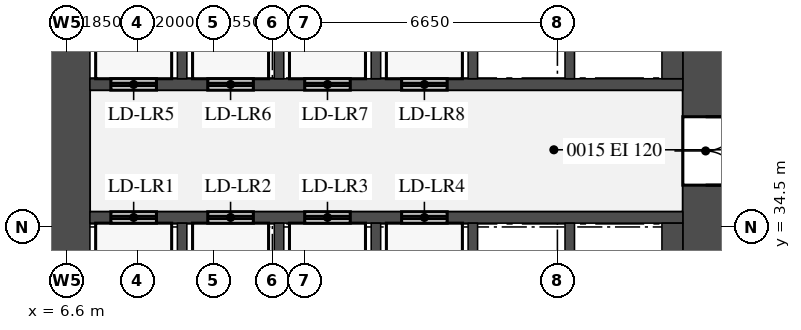
"""IFC4 building model, lengths in metres.
Left out: names, types, materials, properties, quantities, classifications, styles, units other than length and angle.
Written with IfcOpenShell. Run it as: python <this file> out.ifc"""

import sys

from ifc_helpers import new_model, si_unit, direction, frame, frame_2d, origin, place, context, subcontext, project, spatial, rectangle, extrude, source, transform, mapped, element, fill, save


model = new_model("IFC4")
c1 = context("Model", 3, precision=1e-05, world=origin(), true_north=direction((0.0, 1.0)))
c2 = subcontext(c1, "Body", "Model", "MODEL_VIEW")
j1 = project(units=[si_unit("LENGTHUNIT", "METRE"), si_unit("PLANEANGLEUNIT", "RADIAN")], contexts=[c1])
p1 = place(None, origin())
s1 = spatial("IfcSite", under=j1, at=p1, CompositionType="ELEMENT")
p2 = place(p1, origin())
s2 = spatial("IfcBuilding", under=s1, at=p2, CompositionType="ELEMENT")
p3 = place(p2, frame((0.0, 0.0, 60.0)))
s3 = spatial("IfcBuildingStorey", under=s2, at=p3, CompositionType="ELEMENT", Elevation=60.0)
m1 = source(origin(), c2, "Body", "SweptSolid", [
    extrude(rectangle(XDim=27.6, YDim=1.2, at=frame_2d((13.8, 0.0))), origin(), (0.0, 0.0, 1.0), 4.2),
])
p4 = place(p3, frame((23.4, 13.2, 0.0), z_axis=(0.0, 0.0, 1.0), x_axis=(0.0, 1.0, 0.0)))
e1 = element("IfcWall", 1, at=p4, inside=s3, PredefinedType="SHEAR", context=c2, shape_type="MappedRepresentation", body=[
    mapped(m1, transform((0.0, 0.0, 0.0))),
])
m2 = source(origin(), c2, "Body", "SweptSolid", [
    extrude(rectangle(XDim=1.8, YDim=2.1, at=frame_2d((0.9, 1.05))), frame((0.0, 0.61, 0.0), z_axis=(0.0, -1.0, 0.0), x_axis=(1.0, 0.0, 0.0)), (0.0, 0.0, 1.0), 1.22),
])
p5 = place(p4, frame((22.4, 0.0, 0.0)))
e2 = element("IfcOpeningElement", 2, at=p5, cuts=e1, PredefinedType="OPENING", context=c2, shape_type="MappedRepresentation", body=[
    mapped(m2, transform((0.0, 0.0, 0.0))),
])
m3 = source(origin(), c2, "Body", "SweptSolid", [
    extrude(rectangle(XDim=1.2, YDim=2.1, at=frame_2d((0.6, 1.05))), frame((0.0, 0.61, 0.0), z_axis=(0.0, -1.0, 0.0), x_axis=(1.0, 0.0, 0.0)), (0.0, 0.0, 1.0), 1.22),
])
p6 = place(p4, frame((12.15, 0.0, 0.0)))
e3 = element("IfcOpeningElement", 3, at=p6, cuts=e1, PredefinedType="OPENING", context=c2, shape_type="MappedRepresentation", body=[
    mapped(m3, transform((0.0, 0.0, 0.0))),
])
m4 = source(origin(), c2, "Body", "SweptSolid", [
    extrude(rectangle(XDim=0.9, YDim=2.1, at=frame_2d((0.45, 1.05))), frame((0.0, 0.61, 0.0), z_axis=(0.0, -1.0, 0.0), x_axis=(1.0, 0.0, 0.0)), (0.0, 0.0, 1.0), 1.22),
])
p7 = place(p4, frame((4.4, 0.0, 0.0)))
e4 = element("IfcOpeningElement", 4, at=p7, cuts=e1, PredefinedType="OPENING", context=c2, shape_type="MappedRepresentation", body=[
    mapped(m4, transform((0.0, 0.0, 0.0))),
])
p8 = place(p3, frame((6.6, 13.2, 0.0), z_axis=(0.0, 0.0, 1.0), x_axis=(0.0, 1.0, 0.0)))
e5 = element("IfcWall", 5, at=p8, inside=s3, PredefinedType="SHEAR", context=c2, shape_type="MappedRepresentation", body=[
    mapped(m1, transform((0.0, 0.0, 0.0))),
])
m5 = source(origin(), c2, "Body", "SweptSolid", [
    extrude(rectangle(XDim=15.6, YDim=0.3, at=frame_2d((7.8, 0.0))), origin(), (0.0, 0.0, 1.0), 4.2),
])
p9 = place(p3, frame((7.2, 38.25, 0.0), z_axis=(0.0, 0.0, 1.0), x_axis=(1.0, 0.0, 0.0)))
e6 = element("IfcWall", 6, at=p9, inside=s3, PredefinedType="STANDARD", context=c2, shape_type="MappedRepresentation", body=[
    mapped(m5, transform((0.0, 0.0, 0.0))),
])
m6 = source(origin(), c2, "Body", "SweptSolid", [
    extrude(rectangle(XDim=1.2, YDim=2.1, at=frame_2d((0.6, 1.05))), frame((0.0, 0.16, 0.0), z_axis=(0.0, -1.0, 0.0), x_axis=(1.0, 0.0, 0.0)), (0.0, 0.0, 1.0), 0.32),
])
p10 = place(p9, frame((0.55, 0.0, 0.0)))
e7 = element("IfcOpeningElement", 7, at=p10, cuts=e6, PredefinedType="OPENING", context=c2, shape_type="MappedRepresentation", body=[
    mapped(m6, transform((0.0, 0.0, 0.0))),
])
p11 = place(p9, frame((3.1, 0.0, 0.0)))
e8 = element("IfcOpeningElement", 8, at=p11, cuts=e6, PredefinedType="OPENING", context=c2, shape_type="MappedRepresentation", body=[
    mapped(m6, transform((0.0, 0.0, 0.0))),
])
p12 = place(p9, frame((5.65, 0.0, 0.0)))
e9 = element("IfcOpeningElement", 9, at=p12, cuts=e6, PredefinedType="OPENING", context=c2, shape_type="MappedRepresentation", body=[
    mapped(m6, transform((0.0, 0.0, 0.0))),
])
p13 = place(p9, frame((8.2, 0.0, 0.0)))
e10 = element("IfcOpeningElement", 10, at=p13, cuts=e6, PredefinedType="OPENING", context=c2, shape_type="MappedRepresentation", body=[
    mapped(m6, transform((0.0, 0.0, 0.0))),
])
p14 = place(p3, frame((7.2, 34.75, 0.0), z_axis=(0.0, 0.0, 1.0), x_axis=(1.0, 0.0, 0.0)))
e11 = element("IfcWall", 11, at=p14, inside=s3, PredefinedType="STANDARD", context=c2, shape_type="MappedRepresentation", body=[
    mapped(m5, transform((0.0, 0.0, 0.0))),
])
p15 = place(p14, frame((0.55, 0.0, 0.0)))
e12 = element("IfcOpeningElement", 12, at=p15, cuts=e11, PredefinedType="OPENING", context=c2, shape_type="MappedRepresentation", body=[
    mapped(m6, transform((0.0, 0.0, 0.0))),
])
p16 = place(p14, frame((3.1, 0.0, 0.0)))
e13 = element("IfcOpeningElement", 13, at=p16, cuts=e11, PredefinedType="OPENING", context=c2, shape_type="MappedRepresentation", body=[
    mapped(m6, transform((0.0, 0.0, 0.0))),
])
p17 = place(p14, frame((5.65, 0.0, 0.0)))
e14 = element("IfcOpeningElement", 14, at=p17, cuts=e11, PredefinedType="OPENING", context=c2, shape_type="MappedRepresentation", body=[
    mapped(m6, transform((0.0, 0.0, 0.0))),
])
p18 = place(p14, frame((8.2, 0.0, 0.0)))
e15 = element("IfcOpeningElement", 15, at=p18, cuts=e11, PredefinedType="OPENING", context=c2, shape_type="MappedRepresentation", body=[
    mapped(m6, transform((0.0, 0.0, 0.0))),
])
m7 = source(origin(), c2, "Body", "SweptSolid", [
    extrude(rectangle(XDim=2.4, YDim=0.25, at=frame_2d((1.2, 0.0))), origin(), (0.0, 0.0, 1.0), 4.2),
])
for number, where, z_axis, x_axis in (
    (16, (9.625, 38.4, 0.0), (0.0, 0.0, 1.0), (0.0, 1.0, 0.0)),
    (17, (12.175, 38.4, 0.0), (0.0, 0.0, 1.0), (0.0, 1.0, 0.0)),
    (18, (14.725, 38.4, 0.0), (0.0, 0.0, 1.0), (0.0, 1.0, 0.0)),
    (19, (17.275, 38.4, 0.0), (0.0, 0.0, 1.0), (0.0, 1.0, 0.0)),
    (20, (19.825, 38.4, 0.0), (0.0, 0.0, 1.0), (0.0, 1.0, 0.0)),
):
    element("IfcWall", number, at=place(p3, frame(where, z_axis=z_axis, x_axis=x_axis)), inside=s3, PredefinedType="STANDARD", context=c2, shape_type="MappedRepresentation", body=[
        mapped(m7, transform((0.0, 0.0, 0.0))),
    ])
m8 = source(origin(), c2, "Body", "SweptSolid", [
    extrude(rectangle(XDim=2.4, YDim=0.55, at=frame_2d((1.2, 0.0))), origin(), (0.0, 0.0, 1.0), 4.2),
])
p19 = place(p3, frame((22.525, 38.4, 0.0), z_axis=(0.0, 0.0, 1.0), x_axis=(0.0, 1.0, 0.0)))
e21 = element("IfcWall", 21, at=p19, inside=s3, PredefinedType="STANDARD", context=c2, shape_type="MappedRepresentation", body=[
    mapped(m8, transform((0.0, 0.0, 0.0))),
])
for number, where, z_axis, x_axis in (
    (22, (9.625, 32.2, 0.0), (0.0, 0.0, 1.0), (0.0, 1.0, 0.0)),
    (23, (12.175, 32.2, 0.0), (0.0, 0.0, 1.0), (0.0, 1.0, 0.0)),
    (24, (14.725, 32.2, 0.0), (0.0, 0.0, 1.0), (0.0, 1.0, 0.0)),
    (25, (17.275, 32.2, 0.0), (0.0, 0.0, 1.0), (0.0, 1.0, 0.0)),
    (26, (19.825, 32.2, 0.0), (0.0, 0.0, 1.0), (0.0, 1.0, 0.0)),
):
    element("IfcWall", number, at=place(p3, frame(where, z_axis=z_axis, x_axis=x_axis)), inside=s3, PredefinedType="STANDARD", context=c2, shape_type="MappedRepresentation", body=[
        mapped(m7, transform((0.0, 0.0, 0.0))),
    ])
p20 = place(p3, frame((22.525, 32.2, 0.0), z_axis=(0.0, 0.0, 1.0), x_axis=(0.0, 1.0, 0.0)))
e27 = element("IfcWall", 27, at=p20, inside=s3, PredefinedType="STANDARD", context=c2, shape_type="MappedRepresentation", body=[
    mapped(m8, transform((0.0, 0.0, 0.0))),
])
m9 = source(origin(), c2, "Body", "SweptSolid", [
    extrude(rectangle(XDim=1.8, YDim=2.1, at=frame_2d((0.9, 1.05))), frame((0.0, 0.55, 0.0), z_axis=(0.0, -1.0, 0.0), x_axis=(1.0, 0.0, 0.0)), (0.0, 0.0, 1.0), 1.1),
])
p21 = place(p5, origin())
e28 = element("IfcDoor", 28, at=p21, inside=s3, OperationType="DOUBLE_DOOR_SINGLE_SWING", PredefinedType="DOOR", context=c2, shape_type="MappedRepresentation", body=[
    mapped(m9, transform((0.0, 0.0, 0.0))),
])
fill(e2, e28)
m10 = source(origin(), c2, "Body", "SweptSolid", [
    extrude(rectangle(XDim=1.2, YDim=2.1, at=frame_2d((0.6, 1.05))), frame((0.0, 0.025, 0.0), z_axis=(0.0, -1.0, 0.0), x_axis=(1.0, 0.0, 0.0)), (0.0, 0.0, 1.0), 0.05),
])
p22 = place(p15, origin())
e29 = element("IfcDoor", 29, at=p22, inside=s3, OperationType="DOUBLE_DOOR_SLIDING", PredefinedType="DOOR", context=c2, shape_type="MappedRepresentation", body=[
    mapped(m10, transform((0.0, 0.0, 0.0))),
])
fill(e12, e29)
p23 = place(p16, origin())
e30 = element("IfcDoor", 30, at=p23, inside=s3, OperationType="DOUBLE_DOOR_SLIDING", PredefinedType="DOOR", context=c2, shape_type="MappedRepresentation", body=[
    mapped(m10, transform((0.0, 0.0, 0.0))),
])
fill(e13, e30)
p24 = place(p17, origin())
e31 = element("IfcDoor", 31, at=p24, inside=s3, OperationType="DOUBLE_DOOR_SLIDING", PredefinedType="DOOR", context=c2, shape_type="MappedRepresentation", body=[
    mapped(m10, transform((0.0, 0.0, 0.0))),
])
fill(e14, e31)
p25 = place(p18, origin())
e32 = element("IfcDoor", 32, at=p25, inside=s3, OperationType="DOUBLE_DOOR_SLIDING", PredefinedType="DOOR", context=c2, shape_type="MappedRepresentation", body=[
    mapped(m10, transform((0.0, 0.0, 0.0))),
])
fill(e15, e32)
p26 = place(p10, origin())
e33 = element("IfcDoor", 33, at=p26, inside=s3, OperationType="DOUBLE_DOOR_SLIDING", PredefinedType="DOOR", context=c2, shape_type="MappedRepresentation", body=[
    mapped(m10, transform((0.0, 0.0, 0.0))),
])
fill(e7, e33)
p27 = place(p11, origin())
e34 = element("IfcDoor", 34, at=p27, inside=s3, OperationType="DOUBLE_DOOR_SLIDING", PredefinedType="DOOR", context=c2, shape_type="MappedRepresentation", body=[
    mapped(m10, transform((0.0, 0.0, 0.0))),
])
fill(e8, e34)
p28 = place(p12, origin())
e35 = element("IfcDoor", 35, at=p28, inside=s3, OperationType="DOUBLE_DOOR_SLIDING", PredefinedType="DOOR", context=c2, shape_type="MappedRepresentation", body=[
    mapped(m10, transform((0.0, 0.0, 0.0))),
])
fill(e9, e35)
p29 = place(p13, origin())
e36 = element("IfcDoor", 36, at=p29, inside=s3, OperationType="DOUBLE_DOOR_SLIDING", PredefinedType="DOOR", context=c2, shape_type="MappedRepresentation", body=[
    mapped(m10, transform((0.0, 0.0, 0.0))),
])
fill(e10, e36)
save(model, sys.argv[1])
